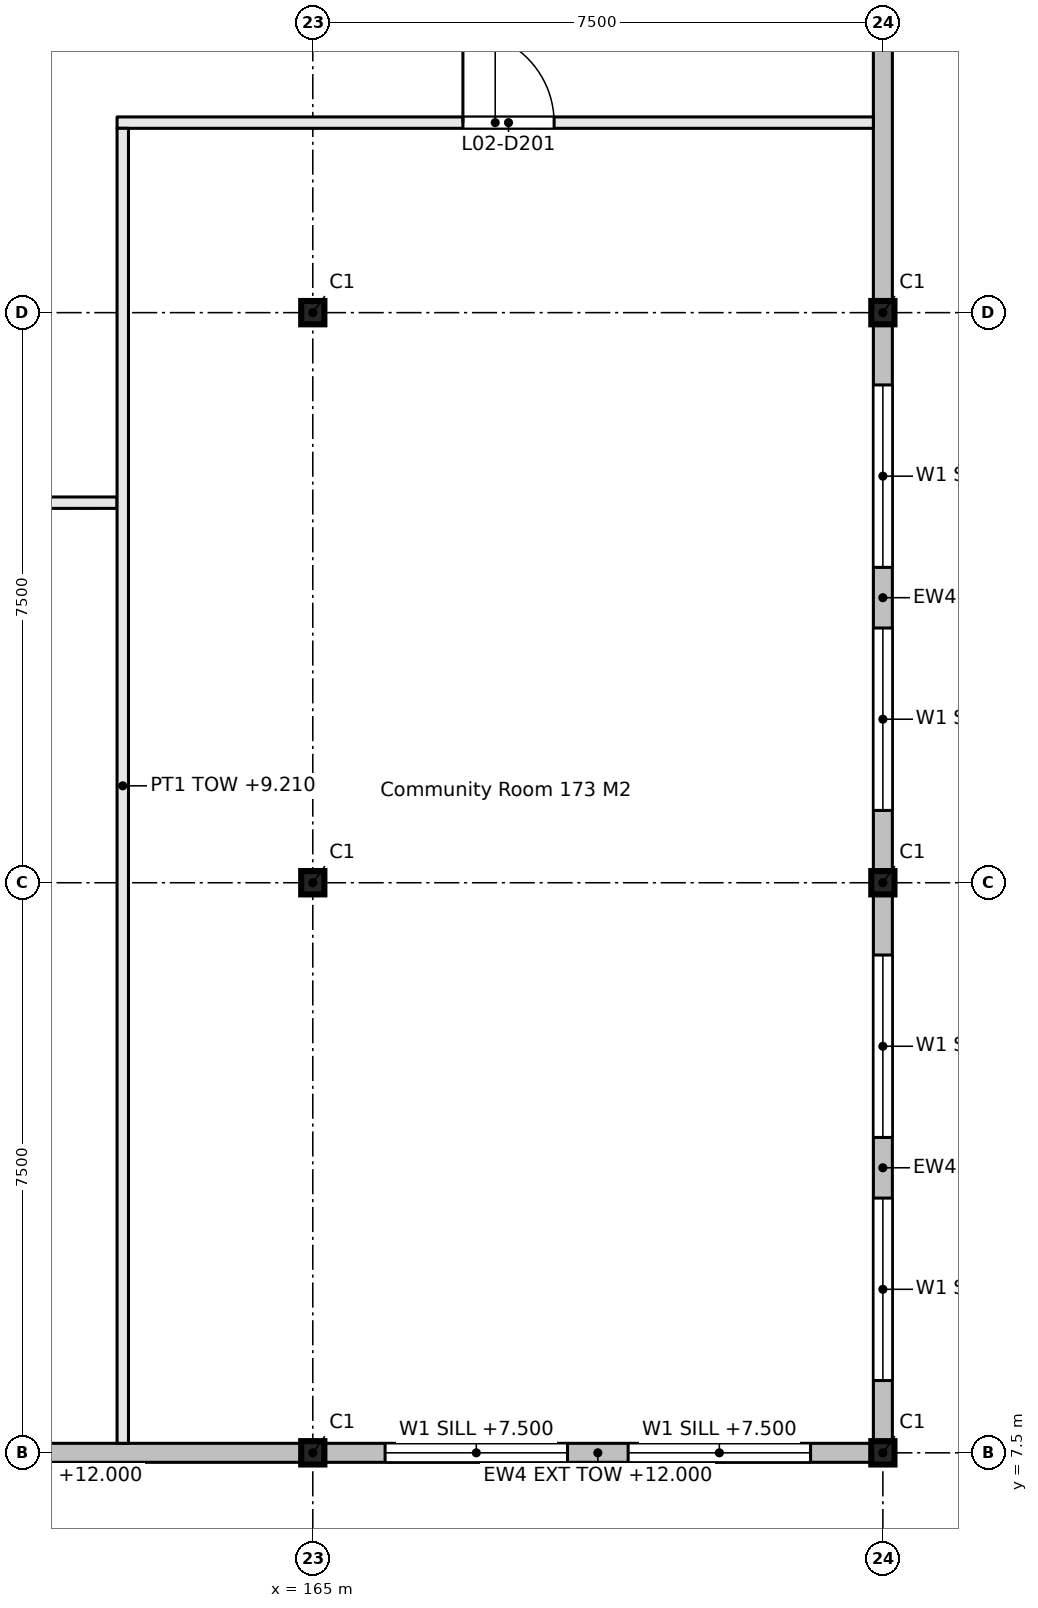
"""IFC4 building model, lengths in metres.
Left out: names, types, materials, properties, quantities, classifications, styles, units other than length and angle.
Written with IfcOpenShell. Run it as: python <this file> out.ifc"""

import sys

from ifc_helpers import new_model, si_unit, direction, frame, frame_2d, origin, origin_2d, place, context, subcontext, project, spatial, rectangle, i_section, extrude, element, fill, save


model = new_model("IFC4")
c1 = context("Model", 3, precision=1e-05, world=origin(), true_north=direction((0.0, 1.0)))
c2 = subcontext(c1, "Body", "Model", "MODEL_VIEW")
j1 = project(units=[si_unit("LENGTHUNIT", "METRE"), si_unit("PLANEANGLEUNIT", "RADIAN")], contexts=[c1])
p1 = place(None, origin())
s1 = spatial("IfcSite", under=j1, at=p1, CompositionType="ELEMENT")
p2 = place(p1, origin())
s2 = spatial("IfcBuilding", under=s1, at=p2, CompositionType="ELEMENT")
p3 = place(p2, frame((0.0, 0.0, 6.6)))
s3 = spatial("IfcBuildingStorey", under=s2, at=p3, CompositionType="ELEMENT", Elevation=6.6)
for number, where, z_axis, x_axis in (
    (1, (165.0, 7.5, 0.0), (0.0, 0.0, 1.0), (1.0, 0.0, 0.0)),
    (2, (165.0, 15.0, 0.0), (0.0, 0.0, 1.0), (1.0, 0.0, 0.0)),
    (3, (165.0, 22.5, 0.0), (0.0, 0.0, 1.0), (1.0, 0.0, 0.0)),
    (4, (172.5, 7.5, 0.0), (0.0, 0.0, 1.0), (1.0, 0.0, 0.0)),
    (5, (172.5, 15.0, 0.0), (0.0, 0.0, 1.0), (1.0, 0.0, 0.0)),
    (6, (172.5, 22.5, 0.0), (0.0, 0.0, 1.0), (1.0, 0.0, 0.0)),
):
    element("IfcColumn", number, at=place(p3, frame(where, z_axis=z_axis, x_axis=x_axis)), inside=s3, PredefinedType="COLUMN", context=c2, shape_type="SweptSolid", body=[
        extrude(i_section(OverallWidth=0.305, OverallDepth=0.307, WebThickness=0.01, FlangeThickness=0.015, FilletRadius=0.015, at=origin_2d()), origin(), (0.0, 0.0, 1.0), 3.3),
    ])
p4 = place(p3, frame((150.125, 20.0, 0.0), z_axis=(0.0, 0.0, 1.0), x_axis=(1.0, 0.0, 0.0)))
e7 = element("IfcWall", 7, at=p4, inside=s3, PredefinedType="PARTITIONING", context=c2, shape_type="SweptSolid", body=[
    extrude(rectangle(XDim=12.3, YDim=0.15, at=frame_2d((6.15, 0.0))), origin(), (0.0, 0.0, 1.0), 2.61),
])
p5 = place(p4, frame((5.425, 0.0, 0.0)))
e8 = element("IfcOpeningElement", 8, at=p5, cuts=e7, PredefinedType="OPENING", context=c2, shape_type="SweptSolid", body=[
    extrude(rectangle(XDim=1.2, YDim=2.1, at=frame_2d((0.6, 1.05))), frame((0.0, 0.085, 0.0), z_axis=(0.0, -1.0, 0.0), x_axis=(1.0, 0.0, 0.0)), (0.0, 0.0, 1.0), 0.17),
])
p6 = place(p3, frame((162.425, 25.0, 0.0), z_axis=(0.0, 0.0, 1.0), x_axis=(1.0, 0.0, 0.0)))
e9 = element("IfcWall", 9, at=p6, inside=s3, PredefinedType="PARTITIONING", context=c2, shape_type="SweptSolid", body=[
    extrude(rectangle(XDim=9.95, YDim=0.15, at=frame_2d((4.975, 0.0))), origin(), (0.0, 0.0, 1.0), 2.61),
])
p7 = place(p6, frame((4.55, 0.0, 0.0)))
e10 = element("IfcOpeningElement", 10, at=p7, cuts=e9, PredefinedType="OPENING", context=c2, shape_type="SweptSolid", body=[
    extrude(rectangle(XDim=1.2, YDim=2.1, at=frame_2d((0.6, 1.05))), frame((0.0, 0.085, 0.0), z_axis=(0.0, -1.0, 0.0), x_axis=(1.0, 0.0, 0.0)), (0.0, 0.0, 1.0), 0.17),
])
p8 = place(p3, frame((162.5, 7.625, 0.0), z_axis=(0.0, 0.0, 1.0), x_axis=(0.0, 1.0, 0.0)))
e11 = element("IfcWall", 11, at=p8, inside=s3, PredefinedType="PARTITIONING", context=c2, shape_type="SweptSolid", body=[
    extrude(rectangle(XDim=17.3, YDim=0.15, at=frame_2d((8.65, 0.0))), origin(), (0.0, 0.0, 1.0), 2.61),
])
p9 = place(p3, frame((157.654, 7.5, 0.0), z_axis=(0.0, 0.0, 1.0), x_axis=(1.0, 0.0, 0.0)))
e12 = element("IfcWall", 12, at=p9, inside=s3, PredefinedType="SOLIDWALL", context=c2, shape_type="SweptSolid", body=[
    extrude(rectangle(XDim=7.193, YDim=0.25, at=frame_2d((3.596, 0.0))), origin(), (0.0, 0.0, 1.0), 5.4),
])
p10 = place(p9, frame((0.498, 0.0, 0.9)))
e13 = element("IfcOpeningElement", 13, at=p10, cuts=e12, PredefinedType="OPENING", context=c2, shape_type="SweptSolid", body=[
    extrude(rectangle(XDim=3.0, YDim=1.5, at=frame_2d((1.5, 0.75))), frame((0.0, 0.135, 0.0), z_axis=(0.0, -1.0, 0.0), x_axis=(1.0, 0.0, 0.0)), (0.0, 0.0, 1.0), 0.27),
])
p11 = place(p3, frame((165.154, 7.5, 0.0), z_axis=(0.0, 0.0, 1.0), x_axis=(1.0, 0.0, 0.0)))
e14 = element("IfcWall", 14, at=p11, inside=s3, PredefinedType="SOLIDWALL", context=c2, shape_type="SweptSolid", body=[
    extrude(rectangle(XDim=7.193, YDim=0.25, at=frame_2d((3.596, 0.0))), origin(), (0.0, 0.0, 1.0), 5.4),
])
p12 = place(p11, frame((0.798, 0.0, 0.9)))
e15 = element("IfcOpeningElement", 15, at=p12, cuts=e14, PredefinedType="OPENING", context=c2, shape_type="SweptSolid", body=[
    extrude(rectangle(XDim=2.4, YDim=1.5, at=frame_2d((1.2, 0.75))), frame((0.0, 0.135, 0.0), z_axis=(0.0, -1.0, 0.0), x_axis=(1.0, 0.0, 0.0)), (0.0, 0.0, 1.0), 0.27),
])
p13 = place(p11, frame((3.995, 0.0, 0.9)))
e16 = element("IfcOpeningElement", 16, at=p13, cuts=e14, PredefinedType="OPENING", context=c2, shape_type="SweptSolid", body=[
    extrude(rectangle(XDim=2.4, YDim=1.5, at=frame_2d((1.2, 0.75))), frame((0.0, 0.135, 0.0), z_axis=(0.0, -1.0, 0.0), x_axis=(1.0, 0.0, 0.0)), (0.0, 0.0, 1.0), 0.27),
])
p14 = place(p3, frame((172.5, 7.654, 0.0), z_axis=(0.0, 0.0, 1.0), x_axis=(0.0, 1.0, 0.0)))
e17 = element("IfcWall", 17, at=p14, inside=s3, PredefinedType="SOLIDWALL", context=c2, shape_type="SweptSolid", body=[
    extrude(rectangle(XDim=7.193, YDim=0.25, at=frame_2d((3.596, 0.0))), origin(), (0.0, 0.0, 1.0), 5.44),
])
p15 = place(p14, frame((0.798, 0.0, 0.9)))
e18 = element("IfcOpeningElement", 18, at=p15, cuts=e17, PredefinedType="OPENING", context=c2, shape_type="SweptSolid", body=[
    extrude(rectangle(XDim=2.4, YDim=1.5, at=frame_2d((1.2, 0.75))), frame((0.0, 0.135, 0.0), z_axis=(0.0, -1.0, 0.0), x_axis=(1.0, 0.0, 0.0)), (0.0, 0.0, 1.0), 0.27),
])
p16 = place(p14, frame((3.995, 0.0, 0.9)))
e19 = element("IfcOpeningElement", 19, at=p16, cuts=e17, PredefinedType="OPENING", context=c2, shape_type="SweptSolid", body=[
    extrude(rectangle(XDim=2.4, YDim=1.5, at=frame_2d((1.2, 0.75))), frame((0.0, 0.135, 0.0), z_axis=(0.0, -1.0, 0.0), x_axis=(1.0, 0.0, 0.0)), (0.0, 0.0, 1.0), 0.27),
])
p17 = place(p3, frame((172.5, 15.154, 0.0), z_axis=(0.0, 0.0, 1.0), x_axis=(0.0, 1.0, 0.0)))
e20 = element("IfcWall", 20, at=p17, inside=s3, PredefinedType="SOLIDWALL", context=c2, shape_type="SweptSolid", body=[
    extrude(rectangle(XDim=7.193, YDim=0.25, at=frame_2d((3.596, 0.0))), origin(), (0.0, 0.0, 1.0), 5.44),
])
p18 = place(p17, frame((0.798, 0.0, 0.9)))
e21 = element("IfcOpeningElement", 21, at=p18, cuts=e20, PredefinedType="OPENING", context=c2, shape_type="SweptSolid", body=[
    extrude(rectangle(XDim=2.4, YDim=1.5, at=frame_2d((1.2, 0.75))), frame((0.0, 0.135, 0.0), z_axis=(0.0, -1.0, 0.0), x_axis=(1.0, 0.0, 0.0)), (0.0, 0.0, 1.0), 0.27),
])
p19 = place(p17, frame((3.995, 0.0, 0.9)))
e22 = element("IfcOpeningElement", 22, at=p19, cuts=e20, PredefinedType="OPENING", context=c2, shape_type="SweptSolid", body=[
    extrude(rectangle(XDim=2.4, YDim=1.5, at=frame_2d((1.2, 0.75))), frame((0.0, 0.135, 0.0), z_axis=(0.0, -1.0, 0.0), x_axis=(1.0, 0.0, 0.0)), (0.0, 0.0, 1.0), 0.27),
])
p20 = place(p3, frame((172.5, 22.654, 0.0), z_axis=(0.0, 0.0, 1.0), x_axis=(0.0, 1.0, 0.0)))
e23 = element("IfcWall", 23, at=p20, inside=s3, PredefinedType="SOLIDWALL", context=c2, shape_type="SweptSolid", body=[
    extrude(rectangle(XDim=7.193, YDim=0.25, at=frame_2d((3.596, 0.0))), origin(), (0.0, 0.0, 1.0), 5.44),
])
p21 = place(p20, frame((3.995, 0.0, 0.9)))
e24 = element("IfcOpeningElement", 24, at=p21, cuts=e23, PredefinedType="OPENING", context=c2, shape_type="SweptSolid", body=[
    extrude(rectangle(XDim=2.4, YDim=1.5, at=frame_2d((1.2, 0.75))), frame((0.0, 0.135, 0.0), z_axis=(0.0, -1.0, 0.0), x_axis=(1.0, 0.0, 0.0)), (0.0, 0.0, 1.0), 0.27),
])
p22 = place(p7, origin())
e25 = element("IfcDoor", 25, at=p22, inside=s3, OperationType="DOUBLE_DOOR_SINGLE_SWING", PredefinedType="DOOR", context=c2, shape_type="SweptSolid", body=[
    extrude(rectangle(XDim=1.2, YDim=2.1, at=frame_2d((0.6, 1.05))), frame((0.0, 0.025, 0.0), z_axis=(0.0, -1.0, 0.0), x_axis=(1.0, 0.0, 0.0)), (0.0, 0.0, 1.0), 0.05),
])
fill(e10, e25)
p23 = place(p12, origin())
e26 = element("IfcWindow", 26, at=p23, inside=s3, PartitioningType="DOUBLE_PANEL_VERTICAL", PredefinedType="WINDOW", context=c2, shape_type="SweptSolid", body=[
    extrude(rectangle(XDim=2.4, YDim=1.5, at=frame_2d((1.2, 0.75))), frame((0.0, 0.03, 0.0), z_axis=(0.0, -1.0, 0.0), x_axis=(1.0, 0.0, 0.0)), (0.0, 0.0, 1.0), 0.06),
])
fill(e15, e26)
p24 = place(p13, origin())
e27 = element("IfcWindow", 27, at=p24, inside=s3, PartitioningType="DOUBLE_PANEL_VERTICAL", PredefinedType="WINDOW", context=c2, shape_type="SweptSolid", body=[
    extrude(rectangle(XDim=2.4, YDim=1.5, at=frame_2d((1.2, 0.75))), frame((0.0, 0.03, 0.0), z_axis=(0.0, -1.0, 0.0), x_axis=(1.0, 0.0, 0.0)), (0.0, 0.0, 1.0), 0.06),
])
fill(e16, e27)
p25 = place(p15, origin())
e28 = element("IfcWindow", 28, at=p25, inside=s3, PartitioningType="DOUBLE_PANEL_VERTICAL", PredefinedType="WINDOW", context=c2, shape_type="SweptSolid", body=[
    extrude(rectangle(XDim=2.4, YDim=1.5, at=frame_2d((1.2, 0.75))), frame((0.0, 0.03, 0.0), z_axis=(0.0, -1.0, 0.0), x_axis=(1.0, 0.0, 0.0)), (0.0, 0.0, 1.0), 0.06),
])
fill(e18, e28)
p26 = place(p16, origin())
e29 = element("IfcWindow", 29, at=p26, inside=s3, PartitioningType="DOUBLE_PANEL_VERTICAL", PredefinedType="WINDOW", context=c2, shape_type="SweptSolid", body=[
    extrude(rectangle(XDim=2.4, YDim=1.5, at=frame_2d((1.2, 0.75))), frame((0.0, 0.03, 0.0), z_axis=(0.0, -1.0, 0.0), x_axis=(1.0, 0.0, 0.0)), (0.0, 0.0, 1.0), 0.06),
])
fill(e19, e29)
p27 = place(p18, origin())
e30 = element("IfcWindow", 30, at=p27, inside=s3, PartitioningType="DOUBLE_PANEL_VERTICAL", PredefinedType="WINDOW", context=c2, shape_type="SweptSolid", body=[
    extrude(rectangle(XDim=2.4, YDim=1.5, at=frame_2d((1.2, 0.75))), frame((0.0, 0.03, 0.0), z_axis=(0.0, -1.0, 0.0), x_axis=(1.0, 0.0, 0.0)), (0.0, 0.0, 1.0), 0.06),
])
fill(e21, e30)
p28 = place(p19, origin())
e31 = element("IfcWindow", 31, at=p28, inside=s3, PartitioningType="DOUBLE_PANEL_VERTICAL", PredefinedType="WINDOW", context=c2, shape_type="SweptSolid", body=[
    extrude(rectangle(XDim=2.4, YDim=1.5, at=frame_2d((1.2, 0.75))), frame((0.0, 0.03, 0.0), z_axis=(0.0, -1.0, 0.0), x_axis=(1.0, 0.0, 0.0)), (0.0, 0.0, 1.0), 0.06),
])
fill(e22, e31)
save(model, sys.argv[1])
